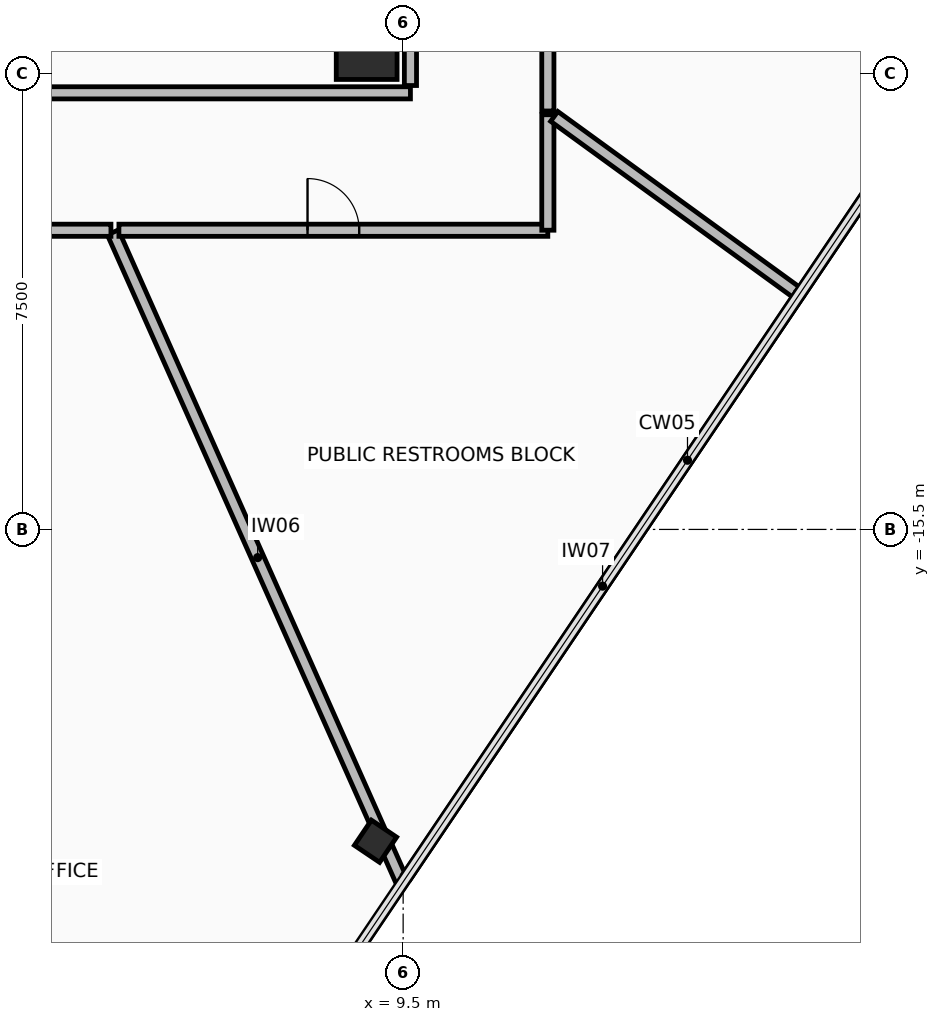
"""IFC4 building model, lengths in metres.
Left out: names, types, materials, properties, quantities, classifications, styles, units other than length and angle.
Written with IfcOpenShell. Run it as: python <this file> out.ifc"""

import sys

from ifc_helpers import new_model, si_unit, direction, frame, frame_2d, origin, origin_2d, place, context, subcontext, project, spatial, rectangle, hollow_rectangle, extrude, element, fill, save


model = new_model("IFC4")
c1 = context("Model", 3, precision=1e-05, world=origin(), true_north=direction((0.0, 1.0)))
c2 = subcontext(c1, "Body", "Model", "MODEL_VIEW")
j1 = project(units=[si_unit("LENGTHUNIT", "METRE"), si_unit("PLANEANGLEUNIT", "RADIAN")], contexts=[c1])
p1 = place(None, origin())
s1 = spatial("IfcSite", under=j1, at=p1, CompositionType="ELEMENT")
p2 = place(p1, origin())
s2 = spatial("IfcBuilding", under=s1, at=p2, CompositionType="ELEMENT")
p3 = place(p2, frame((0.0, 0.0, 227.05)))
s3 = spatial("IfcBuildingStorey", under=s2, at=p3, CompositionType="ELEMENT", Elevation=227.05)
p4 = place(p3, frame((8.9, -7.6, 0.0), z_axis=(0.0, 0.0, 1.0), x_axis=(1.0, 0.0, 0.0)))
e1 = element("IfcColumn", 1, at=p4, inside=s3, PredefinedType="COLUMN", context=c2, shape_type="SweptSolid", body=[
    extrude(rectangle(XDim=1.0, YDim=1.0, at=origin_2d()), origin(), (0.0, 0.0, 1.0), 3.6),
])
p5 = place(p3, frame((9.046, -20.628, -0.19), z_axis=(0.0, 0.0, 1.0), x_axis=(0.559194350413, 0.829036596578, 0.0)))
e2 = element("IfcColumn", 2, at=p5, inside=s3, PredefinedType="COLUMN", context=c2, shape_type="SweptSolid", body=[
    extrude(hollow_rectangle(XDim=0.5, YDim=0.5, WallThickness=0.032, at=origin_2d()), origin(), (0.0, 0.0, 1.0), 3.79),
])
p6 = place(p3, frame((-9.62, -8.32, 0.0), z_axis=(0.0, 0.0, 1.0), x_axis=(1.0, 0.0, 0.0)))
e3 = element("IfcWall", 3, at=p6, inside=s3, PredefinedType="PARTITIONING", context=c2, shape_type="SweptSolid", body=[
    extrude(rectangle(XDim=19.24, YDim=0.2, at=frame_2d((9.62, 0.0))), origin(), (0.0, 0.0, 1.0), 2.915),
])
p7 = place(p6, frame((7.37, 0.0, 0.0)))
e4 = element("IfcOpeningElement", 4, at=p7, cuts=e3, PredefinedType="OPENING", context=c2, shape_type="SweptSolid", body=[
    extrude(rectangle(XDim=0.9, YDim=2.1, at=frame_2d((0.45, 1.05))), frame((0.0, 0.11, 0.0), z_axis=(0.0, -1.0, 0.0), x_axis=(1.0, 0.0, 0.0)), (0.0, 0.0, 1.0), 0.22),
])
p8 = place(p6, frame((10.77, 0.0, 0.0)))
e5 = element("IfcOpeningElement", 5, at=p8, cuts=e3, PredefinedType="OPENING", context=c2, shape_type="SweptSolid", body=[
    extrude(rectangle(XDim=0.9, YDim=2.1, at=frame_2d((0.45, 1.05))), frame((0.0, 0.11, 0.0), z_axis=(0.0, -1.0, 0.0), x_axis=(1.0, 0.0, 0.0)), (0.0, 0.0, 1.0), 0.22),
])
p9 = place(p3, frame((9.62, -8.2, 0.0), z_axis=(0.0, 0.0, 1.0), x_axis=(0.0, 1.0, 0.0)))
e6 = element("IfcWall", 6, at=p9, inside=s3, PredefinedType="PARTITIONING", context=c2, shape_type="SweptSolid", body=[
    extrude(rectangle(XDim=16.4, YDim=0.2, at=frame_2d((8.2, 0.0))), origin(), (0.0, 0.0, 1.0), 2.915),
])
p10 = place(p9, frame((12.65, 0.0, 0.0)))
e7 = element("IfcOpeningElement", 7, at=p10, cuts=e6, PredefinedType="OPENING", context=c2, shape_type="SweptSolid", body=[
    extrude(rectangle(XDim=1.1, YDim=2.15, at=frame_2d((0.55, 1.075))), frame((0.0, 0.11, 0.0), z_axis=(0.0, -1.0, 0.0), x_axis=(1.0, 0.0, 0.0)), (0.0, 0.0, 1.0), 0.22),
])
p11 = place(p3, frame((9.489, -21.312, 0.0), z_axis=(0.0, 0.0, 1.0), x_axis=(-0.406732299424, 0.913547391549, 0.0)))
e8 = element("IfcWall", 8, at=p11, inside=s3, PredefinedType="PARTITIONING", context=c2, shape_type="SweptSolid", body=[
    extrude(rectangle(XDim=11.709, YDim=0.2, at=frame_2d((5.854, 0.0))), origin(), (0.0, 0.0, 1.0), 2.765),
])
p12 = place(p3, frame((4.825, -10.58, 0.0), z_axis=(0.0, 0.0, 1.0), x_axis=(1.0, 0.0, 0.0)))
e9 = element("IfcWall", 9, at=p12, inside=s3, PredefinedType="PARTITIONING", context=c2, shape_type="SweptSolid", body=[
    extrude(rectangle(XDim=7.054, YDim=0.2, at=frame_2d((3.527, 0.0))), origin(), (0.0, 0.0, 1.0), 2.915),
])
p13 = place(p12, frame((3.102, 0.0, 0.0)))
e10 = element("IfcOpeningElement", 10, at=p13, cuts=e9, PredefinedType="OPENING", context=c2, shape_type="SweptSolid", body=[
    extrude(rectangle(XDim=0.85, YDim=2.1, at=frame_2d((0.425, 1.05))), frame((0.0, 0.11, 0.0), z_axis=(0.0, -1.0, 0.0), x_axis=(1.0, 0.0, 0.0)), (0.0, 0.0, 1.0), 0.22),
])
p14 = place(p3, frame((11.88, -10.579, 0.0), z_axis=(0.0, 0.0, 1.0), x_axis=(0.0, 1.0, 0.0)))
e11 = element("IfcWall", 11, at=p14, inside=s3, PredefinedType="PARTITIONING", context=c2, shape_type="SweptSolid", body=[
    extrude(rectangle(XDim=1.899, YDim=0.2, at=frame_2d((0.949, 0.0))), origin(), (0.0, 0.0, 1.0), 3.115),
])
p15 = place(p3, frame((11.985, -8.708, 0.0), z_axis=(0.0, 0.0, 1.0), x_axis=(0.809008579133, -0.587796834705, 0.0)))
e12 = element("IfcWall", 12, at=p15, inside=s3, PredefinedType="PARTITIONING", context=c2, shape_type="SweptSolid", body=[
    extrude(rectangle(XDim=4.958, YDim=0.2, at=frame_2d((2.479, 0.0))), origin(), (0.0, 0.0, 1.0), 2.765),
])
p16 = place(p3, frame((16.002, -11.656, 0.0), z_axis=(0.0, 0.0, 1.0), x_axis=(-0.559190096432, -0.82903946592, 0.0)))
e13 = element("IfcWall", 13, at=p16, inside=s3, PredefinedType="PARTITIONING", context=c2, shape_type="SweptSolid", body=[
    extrude(rectangle(XDim=11.523, YDim=0.15, at=frame_2d((5.762, 0.0))), origin(), (0.0, 0.0, 1.0), 3.42),
])
p17 = place(p3, frame((11.88, -8.619, 0.0), z_axis=(0.0, 0.0, 1.0), x_axis=(0.0, 1.0, 0.0)))
e14 = element("IfcWall", 14, at=p17, inside=s3, PredefinedType="PARTITIONING", context=c2, shape_type="SweptSolid", body=[
    extrude(rectangle(XDim=6.494, YDim=0.2, at=frame_2d((3.247, 0.0))), origin(), (0.0, 0.0, 1.0), 2.915),
])
p18 = place(p3, frame((22.218, -2.441, 0.0), z_axis=(0.0, 0.0, 1.0), x_axis=(-0.55920303242, -0.829030740402, 0.0)))
e15 = element("IfcWall", 15, at=p18, inside=s3, PredefinedType="PARTITIONING", context=c2, shape_type="SweptSolid", body=[
    extrude(rectangle(XDim=11.066, YDim=0.15, at=frame_2d((5.533, 0.0))), origin(), (0.0, 0.0, 1.0), 3.42),
])
p19 = place(p3, frame((-1.09, -10.58, 0.0), z_axis=(0.0, 0.0, 1.0), x_axis=(1.0, 0.0, 0.0)))
e16 = element("IfcWall", 16, at=p19, inside=s3, PredefinedType="PARTITIONING", context=c2, shape_type="SweptSolid", body=[
    extrude(rectangle(XDim=5.784, YDim=0.2, at=frame_2d((2.892, 0.0))), origin(), (0.0, 0.0, 1.0), 3.42),
])
p20 = place(p19, frame((2.392, 0.0, 0.0)))
e17 = element("IfcOpeningElement", 17, at=p20, cuts=e16, PredefinedType="OPENING", context=c2, shape_type="SweptSolid", body=[
    extrude(rectangle(XDim=1.0, YDim=2.15, at=frame_2d((0.5, 1.075))), frame((0.0, 0.11, 0.0), z_axis=(0.0, -1.0, 0.0), x_axis=(1.0, 0.0, 0.0)), (0.0, 0.0, 1.0), 0.22),
])
p21 = place(p13, origin())
e18 = element("IfcDoor", 18, at=p21, inside=s3, OperationType="SINGLE_SWING_RIGHT", PredefinedType="DOOR", context=c2, shape_type="SweptSolid", body=[
    extrude(rectangle(XDim=0.85, YDim=2.1, at=frame_2d((0.425, 1.05))), frame((0.0, 0.025, 0.0), z_axis=(0.0, -1.0, 0.0), x_axis=(1.0, 0.0, 0.0)), (0.0, 0.0, 1.0), 0.05),
])
fill(e10, e18)
save(model, sys.argv[1])
